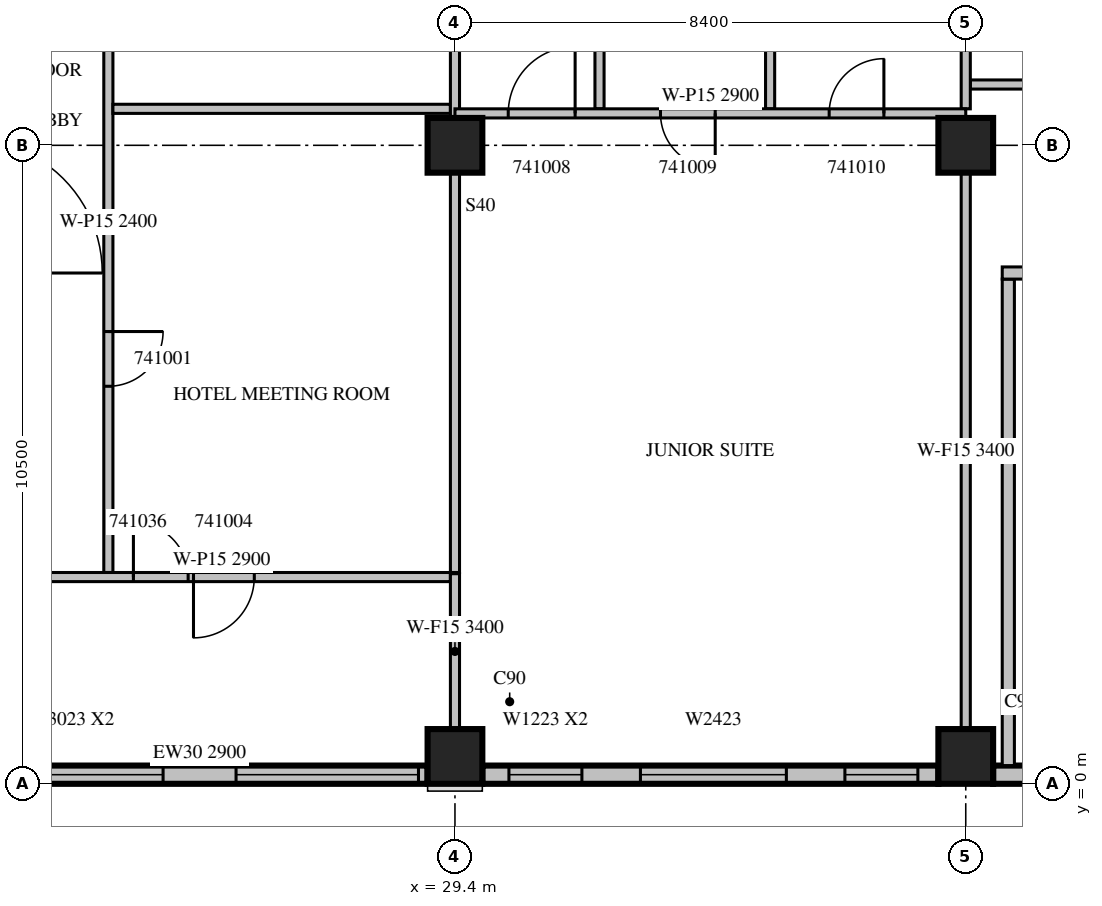
"""IFC4 building model, lengths in metres.
Left out: names, types, materials, properties, quantities, classifications, styles, units other than length and angle.
Written with IfcOpenShell. Run it as: python <this file> out.ifc"""

import sys

from ifc_helpers import new_model, si_unit, direction, frame, frame_2d, origin, origin_2d, place, context, subcontext, project, spatial, rectangle, extrude, source, transform, mapped, element, fill, save


model = new_model("IFC4")
c1 = context("Model", 3, precision=1e-05, world=origin(), true_north=direction((0.0, 1.0)))
c2 = subcontext(c1, "Body", "Model", "MODEL_VIEW")
j1 = project(units=[si_unit("LENGTHUNIT", "METRE"), si_unit("PLANEANGLEUNIT", "RADIAN")], contexts=[c1])
p1 = place(None, origin())
s1 = spatial("IfcSite", under=j1, at=p1, CompositionType="ELEMENT")
p2 = place(p1, origin())
s2 = spatial("IfcBuilding", under=s1, at=p2, CompositionType="ELEMENT")
p3 = place(p2, frame((0.0, 0.0, 189.2)))
s3 = spatial("IfcBuildingStorey", under=s2, at=p3, CompositionType="ELEMENT", Elevation=189.2)
m1 = source(origin(), c2, "Body", "SweptSolid", [
    extrude(rectangle(XDim=0.9, YDim=0.9, at=origin_2d()), origin(), (0.0, 0.0, 1.0), 3.8),
])
for number, where, z_axis, x_axis in (
    (1, (29.4, 0.45, 0.0), (0.0, 0.0, 1.0), (1.0, 0.0, 0.0)),
    (2, (37.8, 0.45, 0.0), (0.0, 0.0, 1.0), (1.0, 0.0, 0.0)),
    (3, (29.4, 10.5, 0.0), (0.0, 0.0, 1.0), (1.0, 0.0, 0.0)),
    (4, (37.8, 10.5, 0.0), (0.0, 0.0, 1.0), (1.0, 0.0, 0.0)),
):
    element("IfcColumn", number, at=place(p3, frame(where, z_axis=z_axis, x_axis=x_axis)), inside=s3, PredefinedType="COLUMN", context=c2, shape_type="MappedRepresentation", body=[
        mapped(m1, transform((0.0, 0.0, 0.0), scale=1.0)),
    ])
m2 = source(origin(), c2, "Body", "SweptSolid", [
    extrude(rectangle(XDim=7.5, YDim=0.3, at=frame_2d((3.75, 0.0))), origin(), (0.0, 0.0, 1.0), 2.9),
])
p4 = place(p3, frame((21.45, 0.15, 0.0), z_axis=(0.0, 0.0, 1.0), x_axis=(1.0, 0.0, 0.0)))
e5 = element("IfcWall", 5, at=p4, inside=s3, PredefinedType="STANDARD", context=c2, shape_type="MappedRepresentation", body=[
    mapped(m2, transform((0.0, 0.0, 0.0), scale=1.0)),
])
m3 = source(origin(), c2, "Body", "SweptSolid", [
    extrude(rectangle(XDim=3.0, YDim=2.3, at=frame_2d((1.5, 1.15))), frame((0.0, 0.16, 0.0), z_axis=(0.0, -1.0, 0.0), x_axis=(1.0, 0.0, 0.0)), (0.0, 0.0, 1.0), 0.32),
])
p5 = place(p4, frame((0.15, 0.0, 0.6)))
e6 = element("IfcOpeningElement", 6, at=p5, cuts=e5, PredefinedType="OPENING", context=c2, shape_type="MappedRepresentation", body=[
    mapped(m3, transform((0.0, 0.0, 0.0), scale=1.0)),
])
p6 = place(p4, frame((4.35, 0.0, 0.6)))
e7 = element("IfcOpeningElement", 7, at=p6, cuts=e5, PredefinedType="OPENING", context=c2, shape_type="MappedRepresentation", body=[
    mapped(m3, transform((0.0, 0.0, 0.0), scale=1.0)),
])
m4 = source(origin(), c2, "Body", "SweptSolid", [
    extrude(rectangle(XDim=7.5, YDim=0.3, at=frame_2d((3.75, 0.0))), origin(), (0.0, 0.0, 1.0), 3.4),
])
p7 = place(p3, frame((29.85, 0.15, 0.0), z_axis=(0.0, 0.0, 1.0), x_axis=(1.0, 0.0, 0.0)))
e8 = element("IfcWall", 8, at=p7, inside=s3, PredefinedType="STANDARD", context=c2, shape_type="MappedRepresentation", body=[
    mapped(m4, transform((0.0, 0.0, 0.0), scale=1.0)),
])
m5 = source(origin(), c2, "Body", "SweptSolid", [
    extrude(rectangle(XDim=1.2, YDim=2.3, at=frame_2d((0.6, 1.15))), frame((0.0, 0.16, 0.0), z_axis=(0.0, -1.0, 0.0), x_axis=(1.0, 0.0, 0.0)), (0.0, 0.0, 1.0), 0.32),
])
p8 = place(p7, frame((0.438, 0.0, 0.6)))
e9 = element("IfcOpeningElement", 9, at=p8, cuts=e8, PredefinedType="OPENING", context=c2, shape_type="MappedRepresentation", body=[
    mapped(m5, transform((0.0, 0.0, 0.0), scale=1.0)),
])
p9 = place(p7, frame((5.963, 0.0, 0.6)))
e10 = element("IfcOpeningElement", 10, at=p9, cuts=e8, PredefinedType="OPENING", context=c2, shape_type="MappedRepresentation", body=[
    mapped(m5, transform((0.0, 0.0, 0.0), scale=1.0)),
])
m6 = source(origin(), c2, "Body", "SweptSolid", [
    extrude(rectangle(XDim=2.4, YDim=2.3, at=frame_2d((1.2, 1.15))), frame((0.0, 0.16, 0.0), z_axis=(0.0, -1.0, 0.0), x_axis=(1.0, 0.0, 0.0)), (0.0, 0.0, 1.0), 0.32),
])
p10 = place(p7, frame((2.6, 0.0, 0.6)))
e11 = element("IfcOpeningElement", 11, at=p10, cuts=e8, PredefinedType="OPENING", context=c2, shape_type="MappedRepresentation", body=[
    mapped(m6, transform((0.0, 0.0, 0.0), scale=1.0)),
])
m7 = source(origin(), c2, "Body", "SweptSolid", [
    extrude(rectangle(XDim=1.95, YDim=0.3, at=frame_2d((0.975, 0.0))), origin(), (0.0, 0.0, 1.0), 3.4),
])
p11 = place(p3, frame((38.25, 0.15, 0.0), z_axis=(0.0, 0.0, 1.0), x_axis=(1.0, 0.0, 0.0)))
e12 = element("IfcWall", 12, at=p11, inside=s3, PredefinedType="STANDARD", context=c2, shape_type="MappedRepresentation", body=[
    mapped(m7, transform((0.0, 0.0, 0.0), scale=1.0)),
])
m8 = source(origin(), c2, "Body", "SweptSolid", [
    extrude(rectangle(XDim=8.0, YDim=0.2, at=frame_2d((4.0, 0.0))), origin(), (0.0, 0.0, 1.0), 3.4),
])
p12 = place(p3, frame((38.5, 0.3, 0.0), z_axis=(0.0, 0.0, 1.0), x_axis=(0.0, 1.0, 0.0)))
e13 = element("IfcWall", 13, at=p12, inside=s3, PredefinedType="PARTITIONING", context=c2, shape_type="MappedRepresentation", body=[
    mapped(m8, transform((0.0, 0.0, 0.0), scale=1.0)),
])
m9 = source(origin(), c2, "Body", "SweptSolid", [
    extrude(rectangle(XDim=5.45, YDim=0.2, at=frame_2d((2.725, 0.0))), origin(), (0.0, 0.0, 1.0), 3.4),
])
p13 = place(p3, frame((38.4, 8.4, 0.0), z_axis=(0.0, 0.0, 1.0), x_axis=(1.0, 0.0, 0.0)))
e14 = element("IfcWall", 14, at=p13, inside=s3, PredefinedType="PARTITIONING", context=c2, shape_type="MappedRepresentation", body=[
    mapped(m9, transform((0.0, 0.0, 0.0), scale=1.0)),
])
m10 = source(origin(), c2, "Body", "SweptSolid", [
    extrude(rectangle(XDim=1.2, YDim=2.1, at=frame_2d((0.6, 1.05))), frame((0.0, 0.11, 0.0), z_axis=(0.0, -1.0, 0.0), x_axis=(1.0, 0.0, 0.0)), (0.0, 0.0, 1.0), 0.22),
])
p14 = place(p13, frame((0.4, 0.0, 0.0)))
e15 = element("IfcOpeningElement", 15, at=p14, cuts=e14, PredefinedType="OPENING", context=c2, shape_type="MappedRepresentation", body=[
    mapped(m10, transform((0.0, 0.0, 0.0), scale=1.0)),
])
m11 = source(origin(), c2, "Body", "SweptSolid", [
    extrude(rectangle(XDim=0.9, YDim=2.1, at=frame_2d((0.45, 1.05))), frame((0.0, 0.11, 0.0), z_axis=(0.0, -1.0, 0.0), x_axis=(1.0, 0.0, 0.0)), (0.0, 0.0, 1.0), 0.22),
])
p15 = place(p13, frame((3.25, 0.0, 0.0)))
e16 = element("IfcOpeningElement", 16, at=p15, cuts=e14, PredefinedType="OPENING", context=c2, shape_type="MappedRepresentation", body=[
    mapped(m11, transform((0.0, 0.0, 0.0), scale=1.0)),
])
m12 = source(origin(), c2, "Body", "SweptSolid", [
    extrude(rectangle(XDim=11.525, YDim=0.15, at=frame_2d((5.763, 0.0))), origin(), (0.0, 0.0, 1.0), 2.4),
])
p16 = place(p3, frame((23.7, 15.0, 0.0), z_axis=(0.0, 0.0, 1.0), x_axis=(0.0, -1.0, 0.0)))
e17 = element("IfcWall", 17, at=p16, inside=s3, PredefinedType="PARTITIONING", context=c2, shape_type="MappedRepresentation", body=[
    mapped(m12, transform((0.0, 0.0, 0.0), scale=1.0)),
])
m13 = source(origin(), c2, "Body", "SweptSolid", [
    extrude(rectangle(XDim=0.9, YDim=2.1, at=frame_2d((0.45, 1.05))), frame((0.0, 0.085, 0.0), z_axis=(0.0, -1.0, 0.0), x_axis=(1.0, 0.0, 0.0)), (0.0, 0.0, 1.0), 0.17),
])
p17 = place(p16, frame((7.562, 0.0, 0.0)))
e18 = element("IfcOpeningElement", 18, at=p17, cuts=e17, PredefinedType="OPENING", context=c2, shape_type="MappedRepresentation", body=[
    mapped(m13, transform((0.0, 0.0, 0.0), scale=1.0)),
])
p18 = place(p16, frame((0.925, 0.0, 0.0)))
e19 = element("IfcOpeningElement", 19, at=p18, cuts=e17, PredefinedType="OPENING", context=c2, shape_type="MappedRepresentation", body=[
    mapped(m13, transform((0.0, 0.0, 0.0), scale=1.0)),
])
m14 = source(origin(), c2, "Body", "SweptSolid", [
    extrude(rectangle(XDim=5.55, YDim=0.15, at=frame_2d((2.775, 0.0))), origin(), (0.0, 0.0, 1.0), 3.4),
])
p19 = place(p3, frame((29.325, 11.1, 0.0), z_axis=(0.0, 0.0, 1.0), x_axis=(-1.0, 0.0, 0.0)))
e20 = element("IfcWall", 20, at=p19, inside=s3, PredefinedType="PARTITIONING", context=c2, shape_type="MappedRepresentation", body=[
    mapped(m14, transform((0.0, 0.0, 0.0), scale=1.0)),
])
m15 = source(origin(), c2, "Body", "SweptSolid", [
    extrude(rectangle(XDim=6.576, YDim=0.15, at=frame_2d((3.288, 0.0))), origin(), (0.0, 0.0, 1.0), 3.4),
])
p20 = place(p3, frame((29.4, 3.475, 0.0), z_axis=(0.0, 0.0, 1.0), x_axis=(0.0, 1.0, 0.0)))
e21 = element("IfcWall", 21, at=p20, inside=s3, PredefinedType="PARTITIONING", context=c2, shape_type="MappedRepresentation", body=[
    mapped(m15, transform((0.0, 0.0, 0.0), scale=1.0)),
])
m16 = source(origin(), c2, "Body", "SweptSolid", [
    extrude(rectangle(XDim=4.051, YDim=0.15, at=frame_2d((2.026, 0.0))), origin(), (0.0, 0.0, 1.0), 3.4),
])
p21 = place(p3, frame((29.4, 10.949, 0.0), z_axis=(0.0, 0.0, 1.0), x_axis=(0.0, 1.0, 0.0)))
e22 = element("IfcWall", 22, at=p21, inside=s3, PredefinedType="PARTITIONING", context=c2, shape_type="MappedRepresentation", body=[
    mapped(m16, transform((0.0, 0.0, 0.0), scale=1.0)),
])
m17 = source(origin(), c2, "Body", "SweptSolid", [
    extrude(rectangle(XDim=7.525, YDim=0.15, at=frame_2d((3.763, 0.0))), origin(), (0.0, 0.0, 1.0), 2.9),
])
p22 = place(p3, frame((21.8, 3.4, 0.0), z_axis=(0.0, 0.0, 1.0), x_axis=(1.0, 0.0, 0.0)))
e23 = element("IfcWall", 23, at=p22, inside=s3, PredefinedType="PARTITIONING", context=c2, shape_type="MappedRepresentation", body=[
    mapped(m17, transform((0.0, 0.0, 0.0), scale=1.0)),
])
m18 = source(origin(), c2, "Body", "SweptSolid", [
    extrude(rectangle(XDim=1.0, YDim=2.1, at=frame_2d((0.5, 1.05))), frame((0.0, 0.085, 0.0), z_axis=(0.0, -1.0, 0.0), x_axis=(1.0, 0.0, 0.0)), (0.0, 0.0, 1.0), 0.17),
])
p23 = place(p22, frame((3.3, 0.0, 0.0)))
e24 = element("IfcOpeningElement", 24, at=p23, cuts=e23, PredefinedType="OPENING", context=c2, shape_type="MappedRepresentation", body=[
    mapped(m18, transform((0.0, 0.0, 0.0), scale=1.0)),
])
p24 = place(p22, frame((2.312, 0.0, 0.0)))
e25 = element("IfcOpeningElement", 25, at=p24, cuts=e23, PredefinedType="OPENING", context=c2, shape_type="MappedRepresentation", body=[
    mapped(m13, transform((0.0, 0.0, 0.0), scale=1.0)),
])
m19 = source(origin(), c2, "Body", "SweptSolid", [
    extrude(rectangle(XDim=6.45, YDim=0.15, at=frame_2d((3.225, 0.0))), origin(), (0.0, 0.0, 1.0), 3.4),
])
p25 = place(p3, frame((37.875, 11.5, 0.0), z_axis=(0.0, 0.0, 1.0), x_axis=(1.0, 0.0, 0.0)))
e26 = element("IfcWall", 26, at=p25, inside=s3, PredefinedType="PARTITIONING", context=c2, shape_type="MappedRepresentation", body=[
    mapped(m19, transform((0.0, 0.0, 0.0), scale=1.0)),
])
m20 = source(origin(), c2, "Body", "SweptSolid", [
    extrude(rectangle(XDim=3.9, YDim=0.15, at=frame_2d((1.95, 0.0))), origin(), (0.0, 0.0, 1.0), 3.4),
])
for number, where, z_axis, x_axis in (
    (27, (31.777, 11.1, 0.0), (0.0, 0.0, 1.0), (0.0, 1.0, 0.0)),
    (28, (34.583, 11.1, 0.0), (0.0, 0.0, 1.0), (0.0, 1.0, 0.0)),
):
    element("IfcWall", number, at=place(p3, frame(where, z_axis=z_axis, x_axis=x_axis)), inside=s3, PredefinedType="PARTITIONING", context=c2, shape_type="MappedRepresentation", body=[
        mapped(m20, transform((0.0, 0.0, 0.0), scale=1.0)),
    ])
m21 = source(origin(), c2, "Body", "SweptSolid", [
    extrude(rectangle(XDim=2.556, YDim=0.15, at=frame_2d((1.278, 0.0))), origin(), (0.0, 0.0, 1.0), 3.4),
])
p26 = place(p3, frame((29.4, 0.899, 0.0), z_axis=(0.0, 0.0, 1.0), x_axis=(0.0, 1.0, 0.0)))
e29 = element("IfcWall", 29, at=p26, inside=s3, PredefinedType="PARTITIONING", context=c2, shape_type="MappedRepresentation", body=[
    mapped(m21, transform((0.0, 0.0, 0.0), scale=1.0)),
])
m22 = source(origin(), c2, "Body", "SweptSolid", [
    extrude(rectangle(XDim=9.152, YDim=0.15, at=frame_2d((4.576, 0.0))), origin(), (0.0, 0.0, 1.0), 3.4),
])
p27 = place(p3, frame((37.8, 0.899, 0.0), z_axis=(0.0, 0.0, 1.0), x_axis=(0.0, 1.0, 0.0)))
e30 = element("IfcWall", 30, at=p27, inside=s3, PredefinedType="PARTITIONING", context=c2, shape_type="MappedRepresentation", body=[
    mapped(m22, transform((0.0, 0.0, 0.0), scale=1.0)),
])
p28 = place(p3, frame((37.8, 11.1, 0.0), z_axis=(0.0, 0.0, 1.0), x_axis=(0.0, 1.0, 0.0)))
e31 = element("IfcWall", 31, at=p28, inside=s3, PredefinedType="PARTITIONING", context=c2, shape_type="MappedRepresentation", body=[
    mapped(m20, transform((0.0, 0.0, 0.0), scale=1.0)),
])
m23 = source(origin(), c2, "Body", "SweptSolid", [
    extrude(rectangle(XDim=8.4, YDim=0.15, at=frame_2d((4.2, 0.0))), origin(), (0.0, 0.0, 1.0), 2.9),
])
p29 = place(p3, frame((37.8, 11.025, 0.0), z_axis=(0.0, 0.0, 1.0), x_axis=(-1.0, 0.0, 0.0)))
e32 = element("IfcWall", 32, at=p29, inside=s3, PredefinedType="PARTITIONING", context=c2, shape_type="MappedRepresentation", body=[
    mapped(m23, transform((0.0, 0.0, 0.0), scale=1.0)),
])
m24 = source(origin(), c2, "Body", "SweptSolid", [
    extrude(rectangle(XDim=1.1, YDim=2.1, at=frame_2d((0.55, 1.05))), frame((0.0, 0.085, 0.0), z_axis=(0.0, -1.0, 0.0), x_axis=(1.0, 0.0, 0.0)), (0.0, 0.0, 1.0), 0.17),
])
p30 = place(p29, frame((6.424, 0.0, 0.0)))
e33 = element("IfcOpeningElement", 33, at=p30, cuts=e32, PredefinedType="OPENING", context=c2, shape_type="MappedRepresentation", body=[
    mapped(m24, transform((0.0, 0.0, 0.0), scale=1.0)),
])
p31 = place(p29, frame((4.12, 0.0, 0.0)))
e34 = element("IfcOpeningElement", 34, at=p31, cuts=e32, PredefinedType="OPENING", context=c2, shape_type="MappedRepresentation", body=[
    mapped(m13, transform((0.0, 0.0, 0.0), scale=1.0)),
])
p32 = place(p29, frame((1.346, 0.0, 0.0)))
e35 = element("IfcOpeningElement", 35, at=p32, cuts=e32, PredefinedType="OPENING", context=c2, shape_type="MappedRepresentation", body=[
    mapped(m13, transform((0.0, 0.0, 0.0), scale=1.0)),
])
m25 = source(origin(), c2, "Body", "SweptSolid", [
    extrude(rectangle(XDim=3.0, YDim=2.3, at=frame_2d((1.5, 1.15))), frame((0.0, 0.03, 0.0), z_axis=(0.0, -1.0, 0.0), x_axis=(1.0, 0.0, 0.0)), (0.0, 0.0, 1.0), 0.06),
])
p33 = place(p5, origin())
e36 = element("IfcWindow", 36, at=p33, inside=s3, PartitioningType="SINGLE_PANEL", PredefinedType="WINDOW", context=c2, shape_type="MappedRepresentation", body=[
    mapped(m25, transform((0.0, 0.0, 0.0), scale=1.0)),
])
fill(e6, e36)
p34 = place(p6, origin())
e37 = element("IfcWindow", 37, at=p34, inside=s3, PartitioningType="SINGLE_PANEL", PredefinedType="WINDOW", context=c2, shape_type="MappedRepresentation", body=[
    mapped(m25, transform((0.0, 0.0, 0.0), scale=1.0)),
])
fill(e7, e37)
m26 = source(origin(), c2, "Body", "SweptSolid", [
    extrude(rectangle(XDim=1.2, YDim=2.3, at=frame_2d((0.6, 1.15))), frame((0.0, 0.03, 0.0), z_axis=(0.0, -1.0, 0.0), x_axis=(1.0, 0.0, 0.0)), (0.0, 0.0, 1.0), 0.06),
])
p35 = place(p8, origin())
e38 = element("IfcWindow", 38, at=p35, inside=s3, PartitioningType="SINGLE_PANEL", PredefinedType="WINDOW", context=c2, shape_type="MappedRepresentation", body=[
    mapped(m26, transform((0.0, 0.0, 0.0), scale=1.0)),
])
fill(e9, e38)
p36 = place(p9, origin())
e39 = element("IfcWindow", 39, at=p36, inside=s3, PartitioningType="SINGLE_PANEL", PredefinedType="WINDOW", context=c2, shape_type="MappedRepresentation", body=[
    mapped(m26, transform((0.0, 0.0, 0.0), scale=1.0)),
])
fill(e10, e39)
m27 = source(origin(), c2, "Body", "SweptSolid", [
    extrude(rectangle(XDim=2.4, YDim=2.3, at=frame_2d((1.2, 1.15))), frame((0.0, 0.03, 0.0), z_axis=(0.0, -1.0, 0.0), x_axis=(1.0, 0.0, 0.0)), (0.0, 0.0, 1.0), 0.06),
])
p37 = place(p10, origin())
e40 = element("IfcWindow", 40, at=p37, inside=s3, PartitioningType="SINGLE_PANEL", PredefinedType="WINDOW", context=c2, shape_type="MappedRepresentation", body=[
    mapped(m27, transform((0.0, 0.0, 0.0), scale=1.0)),
])
fill(e11, e40)
m28 = source(origin(), c2, "Body", "SweptSolid", [
    extrude(rectangle(XDim=0.9, YDim=2.1, at=frame_2d((0.45, 1.05))), frame((0.0, 0.025, 0.0), z_axis=(0.0, -1.0, 0.0), x_axis=(1.0, 0.0, 0.0)), (0.0, 0.0, 1.0), 0.05),
])
p38 = place(p17, origin())
e41 = element("IfcDoor", 41, at=p38, inside=s3, OperationType="SINGLE_SWING_LEFT", PredefinedType="DOOR", context=c2, shape_type="MappedRepresentation", body=[
    mapped(m28, transform((0.0, 0.0, 0.0), scale=1.0)),
])
fill(e18, e41)
m29 = source(origin(), c2, "Body", "SweptSolid", [
    extrude(rectangle(XDim=1.0, YDim=2.1, at=frame_2d((0.5, 1.05))), frame((0.0, 0.025, 0.0), z_axis=(0.0, -1.0, 0.0), x_axis=(1.0, 0.0, 0.0)), (0.0, 0.0, 1.0), 0.05),
])
p39 = place(p23, origin())
e42 = element("IfcDoor", 42, at=p39, inside=s3, OperationType="SINGLE_SWING_RIGHT", PredefinedType="DOOR", context=c2, shape_type="MappedRepresentation", body=[
    mapped(m29, transform((0.0, 0.0, 0.0), scale=1.0)),
])
fill(e24, e42)
m30 = source(origin(), c2, "Body", "SweptSolid", [
    extrude(rectangle(XDim=1.1, YDim=2.1, at=frame_2d((0.55, 1.05))), frame((0.0, 0.025, 0.0), z_axis=(0.0, -1.0, 0.0), x_axis=(1.0, 0.0, 0.0)), (0.0, 0.0, 1.0), 0.05),
])
p40 = place(p30, origin())
e43 = element("IfcDoor", 43, at=p40, inside=s3, OperationType="SINGLE_SWING_RIGHT", PredefinedType="DOOR", context=c2, shape_type="MappedRepresentation", body=[
    mapped(m30, transform((0.0, 0.0, 0.0), scale=1.0)),
])
fill(e33, e43)
p41 = place(p31, origin())
e44 = element("IfcDoor", 44, at=p41, inside=s3, OperationType="SINGLE_SWING_LEFT", PredefinedType="DOOR", context=c2, shape_type="MappedRepresentation", body=[
    mapped(m28, transform((0.0, 0.0, 0.0), scale=1.0)),
])
fill(e34, e44)
p42 = place(p32, origin())
e45 = element("IfcDoor", 45, at=p42, inside=s3, OperationType="SINGLE_SWING_RIGHT", PredefinedType="DOOR", context=c2, shape_type="MappedRepresentation", body=[
    mapped(m28, transform((0.0, 0.0, 0.0), scale=1.0)),
])
fill(e35, e45)
p43 = place(p24, origin())
e46 = element("IfcDoor", 46, at=p43, inside=s3, OperationType="SINGLE_SWING_LEFT", PredefinedType="DOOR", context=c2, shape_type="MappedRepresentation", body=[
    mapped(m28, transform((0.0, 0.0, 0.0), scale=1.0)),
])
fill(e25, e46)
save(model, sys.argv[1])
